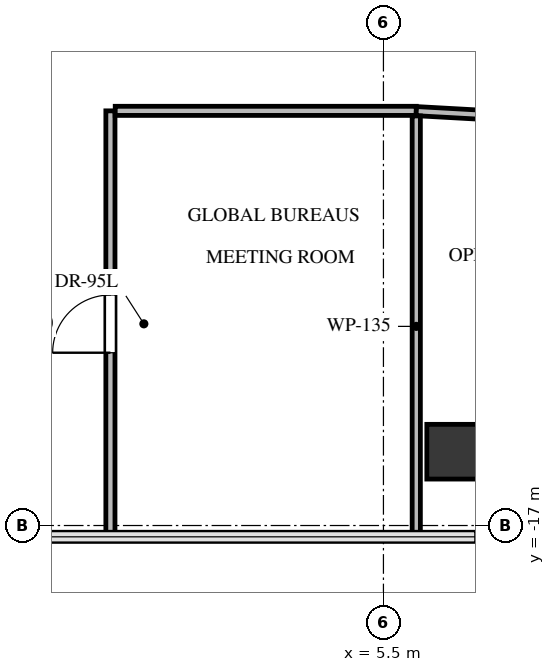
"""IFC4 building model, lengths in metres.
Left out: names, types, materials, properties, quantities, classifications, styles, units other than length and angle.
Written with IfcOpenShell. Run it as: python <this file> out.ifc"""

import sys

from ifc_helpers import new_model, si_unit, direction, frame, frame_2d, origin, origin_2d, place, context, subcontext, project, spatial, rectangle, extrude, source, transform, mapped, element, fill, save


model = new_model("IFC4")
c1 = context("Model", 3, precision=1e-05, world=origin(), true_north=direction((0.0, 1.0)))
c2 = subcontext(c1, "Body", "Model", "MODEL_VIEW")
j1 = project(units=[si_unit("LENGTHUNIT", "METRE"), si_unit("PLANEANGLEUNIT", "RADIAN")], contexts=[c1])
p1 = place(None, origin())
s1 = spatial("IfcSite", under=j1, at=p1, CompositionType="ELEMENT")
p2 = place(p1, origin())
s2 = spatial("IfcBuilding", under=s1, at=p2, CompositionType="ELEMENT")
p3 = place(p2, frame((0.0, 0.0, 238.1)))
s3 = spatial("IfcBuildingStorey", under=s2, at=p3, CompositionType="ELEMENT", Elevation=238.1)
m1 = source(origin(), c2, "Body", "SweptSolid", [
    extrude(rectangle(XDim=0.9, YDim=0.9, at=origin_2d()), origin(), (0.0, 0.0, 1.0), 3.3),
])
p4 = place(p3, frame((6.664, -15.786, -0.24), z_axis=(0.0, 0.0, 1.0), x_axis=(1.0, 0.0, 0.0)))
e1 = element("IfcColumn", 1, at=p4, inside=s3, PredefinedType="COLUMN", context=c2, shape_type="MappedRepresentation", body=[
    mapped(m1, transform((0.0, 0.0, 0.0), x_axis=(1.0, 0.0, 0.0), y_axis=(0.0, 1.0, 0.0), z_axis=(0.0, 0.0, 1.0), scale=1.0)),
])
p5 = place(p3, frame((1.01, -17.186, 0.0), z_axis=(0.0, 0.0, 1.0), x_axis=(0.0, 1.0, 0.0)))
e2 = element("IfcWall", 2, at=p5, inside=s3, PredefinedType="PARTITIONING", context=c2, shape_type="SweptSolid", body=[
    extrude(rectangle(XDim=7.006, YDim=0.15, at=frame_2d((3.503, 0.0))), origin(), (0.0, 0.0, 1.0), 2.399),
])
p6 = place(p5, frame((3.028, 0.0, 0.0)))
e3 = element("IfcOpeningElement", 3, at=p6, cuts=e2, PredefinedType="OPENING", context=c2, shape_type="SweptSolid", body=[
    extrude(rectangle(XDim=0.95, YDim=2.1, at=frame_2d((0.475, 1.05))), frame((0.0, 0.085, 0.0), z_axis=(0.0, -1.0, 0.0), x_axis=(1.0, 0.0, 0.0)), (0.0, 0.0, 1.0), 0.17),
])
p7 = place(p3, frame((1.089, -10.18, 0.0), z_axis=(0.0, 0.0, 1.0), x_axis=(1.0, 0.0, 0.0)))
e4 = element("IfcWall", 4, at=p7, inside=s3, PredefinedType="PARTITIONING", context=c2, shape_type="SweptSolid", body=[
    extrude(rectangle(XDim=4.951, YDim=0.15, at=frame_2d((2.476, 0.0))), origin(), (0.0, 0.0, 1.0), 2.301),
])
p8 = place(p3, frame((6.04, -10.185, 0.0), z_axis=(0.0, 0.0, 1.0), x_axis=(0.998451046252, -0.055637291801, 0.0)))
e5 = element("IfcWall", 5, at=p8, inside=s3, PredefinedType="PARTITIONING", context=c2, shape_type="SweptSolid", body=[
    extrude(rectangle(XDim=6.709, YDim=0.15, at=frame_2d((3.355, 0.0))), origin(), (0.0, 0.0, 1.0), 2.399),
])
p9 = place(p8, frame((2.895, 0.0, 0.0)))
e6 = element("IfcOpeningElement", 6, at=p9, cuts=e5, PredefinedType="OPENING", context=c2, shape_type="SweptSolid", body=[
    extrude(rectangle(XDim=0.92, YDim=2.1, at=frame_2d((0.46, 1.05))), frame((0.0, 0.085, 0.0), z_axis=(0.0, -1.0, 0.0), x_axis=(1.0, 0.0, 0.0)), (0.0, 0.0, 1.0), 0.17),
])
p10 = place(p3, frame((6.04, -10.264, 0.0), z_axis=(0.0, 0.0, 1.0), x_axis=(0.0, -1.0, 0.0)))
e7 = element("IfcWall", 7, at=p10, inside=s3, PredefinedType="PARTITIONING", context=c2, shape_type="SweptSolid", body=[
    extrude(rectangle(XDim=6.922, YDim=0.135, at=frame_2d((3.461, 0.0))), origin(), (0.0, 0.0, 1.0), 2.301),
])
m2 = source(origin(), c2, "Body", "SweptSolid", [
    extrude(rectangle(XDim=0.95, YDim=2.1, at=frame_2d((0.475, 1.05))), frame((0.0, 0.025, 0.0), z_axis=(0.0, -1.0, 0.0), x_axis=(1.0, 0.0, 0.0)), (0.0, 0.0, 1.0), 0.05),
])
p11 = place(p6, origin())
e8 = element("IfcDoor", 8, at=p11, inside=s3, OperationType="SINGLE_SWING_LEFT", PredefinedType="DOOR", context=c2, shape_type="MappedRepresentation", body=[
    mapped(m2, transform((0.0, 0.0, 0.0), x_axis=(1.0, 0.0, 0.0), y_axis=(0.0, 1.0, 0.0), z_axis=(0.0, 0.0, 1.0), scale=1.0)),
])
fill(e3, e8)
save(model, sys.argv[1])
